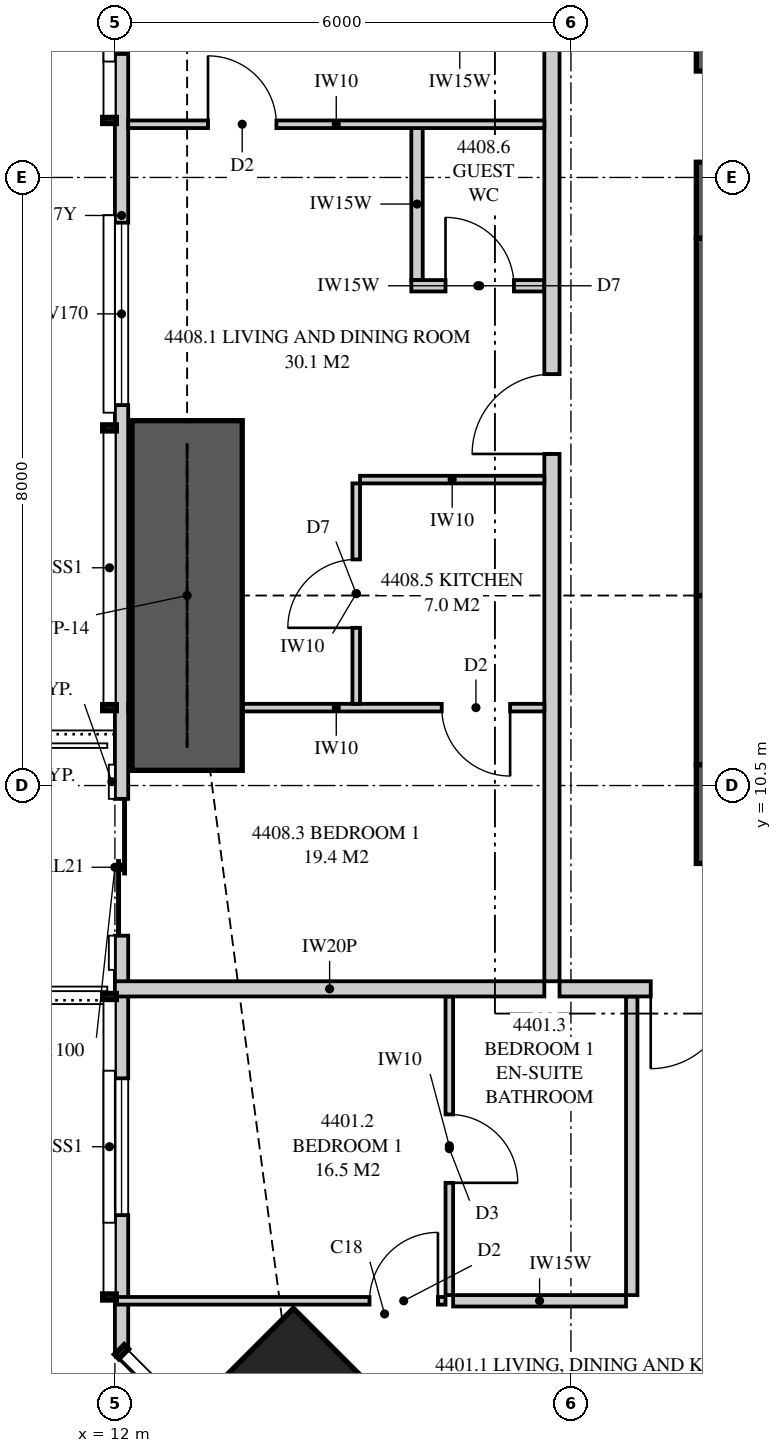
"""IFC4 building model, lengths in metres.
Left out: names, types, materials, properties, quantities, classifications, styles, units other than length and angle.
Written with IfcOpenShell. Run it as: python <this file> out.ifc"""

import sys

from ifc_helpers import new_model, si_unit, direction, frame, frame_2d, origin, origin_2d, place, context, subcontext, project, spatial, polyline, rectangle, outline, extrude, element, fill, save


model = new_model("IFC4")
c1 = context("Model", 3, precision=1e-05, world=origin(), true_north=direction((0.0, 1.0)))
c2 = subcontext(c1, "Body", "Model", "MODEL_VIEW")
j1 = project(units=[si_unit("LENGTHUNIT", "METRE"), si_unit("PLANEANGLEUNIT", "RADIAN")], contexts=[c1])
p1 = place(None, origin())
s1 = spatial("IfcSite", under=j1, at=p1, CompositionType="ELEMENT")
p2 = place(p1, origin())
s2 = spatial("IfcBuilding", under=s1, at=p2, CompositionType="ELEMENT")
p3 = place(p2, frame((0.0, 0.0, 164.4)))
s3 = spatial("IfcBuildingStorey", under=s2, at=p3, CompositionType="ELEMENT", Elevation=164.4)
p4 = place(p3, frame((14.348, 2.348, 0.0), z_axis=(0.0, 0.0, 1.0), x_axis=(0.707106781187, 0.707106781187, 0.0)))
e1 = element("IfcColumn", 1, at=p4, inside=s3, PredefinedType="COLUMN", context=c2, shape_type="SweptSolid", body=[
    extrude(rectangle(XDim=1.8, YDim=1.8, at=origin_2d()), origin(), (0.0, 0.0, 1.0), 3.35),
])
p5 = place(p3, frame((19.65, 10.125, 0.0), z_axis=(0.0, 0.0, 1.0), x_axis=(1.0, 0.0, 0.0)))
e2 = element("IfcWall", 2, at=p5, inside=s3, PredefinedType="SHEAR", context=c2, shape_type="SweptSolid", body=[
    extrude(rectangle(XDim=6.35, YDim=1.3, at=frame_2d((3.175, 0.0))), origin(), (0.0, 0.0, 1.0), 3.35),
])
p6 = place(p5, frame((4.775, 0.0, 0.0)))
e3 = element("IfcOpeningElement", 3, at=p6, cuts=e2, PredefinedType="OPENING", context=c2, shape_type="SweptSolid", body=[
    extrude(rectangle(XDim=0.75, YDim=2.1, at=frame_2d((0.375, 1.05))), frame((0.0, 0.66, 0.0), z_axis=(0.0, -1.0, 0.0), x_axis=(1.0, 0.0, 0.0)), (0.0, 0.0, 1.0), 1.32),
])
p7 = place(p3, frame((20.0, 23.3, 0.0), z_axis=(0.0, 0.0, 1.0), x_axis=(0.0, -1.0, 0.0)))
e4 = element("IfcWall", 4, at=p7, inside=s3, PredefinedType="SHEAR", context=c2, shape_type="SweptSolid", body=[
    extrude(rectangle(XDim=5.6, YDim=0.7, at=frame_2d((2.8, 0.0))), origin(), (0.0, 0.0, 1.0), 3.35),
])
p8 = place(p7, frame((3.4, 0.0, 0.0)))
e5 = element("IfcOpeningElement", 5, at=p8, cuts=e4, PredefinedType="OPENING", context=c2, shape_type="SweptSolid", body=[
    extrude(rectangle(XDim=1.2, YDim=2.2, at=frame_2d((0.6, 1.1))), frame((0.0, 0.36, 0.0), z_axis=(0.0, -1.0, 0.0), x_axis=(1.0, 0.0, 0.0)), (0.0, 0.0, 1.0), 0.72),
])
p9 = place(p3, frame((20.0, 17.7, 0.0), z_axis=(0.0, 0.0, 1.0), x_axis=(0.0, -1.0, 0.0)))
e6 = element("IfcWall", 6, at=p9, inside=s3, PredefinedType="SHEAR", context=c2, shape_type="SweptSolid", body=[
    extrude(rectangle(XDim=4.7, YDim=0.7, at=frame_2d((2.35, 0.0))), origin(), (0.0, 0.0, 1.0), 3.35),
])
p10 = place(p3, frame((20.0, 13.0, 0.0), z_axis=(0.0, 0.0, 1.0), x_axis=(0.0, -1.0, 0.0)))
e7 = element("IfcWall", 7, at=p10, inside=s3, PredefinedType="SHEAR", context=c2, shape_type="SweptSolid", body=[
    extrude(rectangle(XDim=2.225, YDim=0.7, at=frame_2d((1.113, 0.0))), origin(), (0.0, 0.0, 1.0), 3.35),
])
p11 = place(p3, frame((12.087, 32.949, 0.0), z_axis=(0.0, 0.0, 1.0), x_axis=(0.0, -1.0, 0.0)))
e8 = element("IfcWall", 8, at=p11, inside=s3, PredefinedType="SOLIDWALL", context=c2, shape_type="SweptSolid", body=[
    extrude(outline(polyline([(0.0, 0.0), (29.897, 0.0), (29.897, 3.11), (20.191, 3.11), (20.191, 2.15), (20.051, 2.15), (20.051, 3.11), (19.949, 3.11), (19.949, 2.15), (7.949, 2.15), (7.949, 3.11), (7.823, 3.11), (7.823, 2.15), (7.73, 2.15), (7.73, 3.11), (0.0, 3.11), (0.0, 0.0)])), frame((0.0, 0.087, 0.0), z_axis=(0.0, -1.0, 0.0), x_axis=(1.0, 0.0, 0.0)), (0.0, 0.0, 1.0), 0.175),
])
p12 = place(p11, frame((1.297, 0.0, 0.4)))
e9 = element("IfcOpeningElement", 9, at=p12, cuts=e8, PredefinedType="OPENING", context=c2, shape_type="SweptSolid", body=[
    extrude(rectangle(XDim=1.8, YDim=1.7, at=frame_2d((0.9, 0.85))), frame((0.0, 0.097, 0.0), z_axis=(0.0, -1.0, 0.0), x_axis=(1.0, 0.0, 0.0)), (0.0, 0.0, 1.0), 0.195),
])
p13 = place(p11, frame((4.349, 0.0, 0.4)))
e10 = element("IfcOpeningElement", 10, at=p13, cuts=e8, PredefinedType="OPENING", context=c2, shape_type="SweptSolid", body=[
    extrude(rectangle(XDim=1.2, YDim=1.7, at=frame_2d((0.6, 0.85))), frame((0.0, 0.097, 0.0), z_axis=(0.0, -1.0, 0.0), x_axis=(1.0, 0.0, 0.0)), (0.0, 0.0, 1.0), 0.195),
])
p14 = place(p11, frame((11.024, 0.0, 0.4)))
e11 = element("IfcOpeningElement", 11, at=p14, cuts=e8, PredefinedType="OPENING", context=c2, shape_type="SweptSolid", body=[
    extrude(rectangle(XDim=1.8, YDim=1.7, at=frame_2d((0.9, 0.85))), frame((0.0, 0.097, 0.0), z_axis=(0.0, -1.0, 0.0), x_axis=(1.0, 0.0, 0.0)), (0.0, 0.0, 1.0), 0.195),
])
p15 = place(p11, frame((15.044, 0.0, 0.4)))
e12 = element("IfcOpeningElement", 12, at=p15, cuts=e8, PredefinedType="OPENING", context=c2, shape_type="SweptSolid", body=[
    extrude(rectangle(XDim=2.4, YDim=1.7, at=frame_2d((1.2, 0.85))), frame((0.0, 0.097, 0.0), z_axis=(0.0, -1.0, 0.0), x_axis=(1.0, 0.0, 0.0)), (0.0, 0.0, 1.0), 0.195),
])
p16 = place(p11, frame((22.624, 0.0, 0.0)))
e13 = element("IfcOpeningElement", 13, at=p16, cuts=e8, PredefinedType="OPENING", context=c2, shape_type="SweptSolid", body=[
    extrude(rectangle(XDim=1.8, YDim=2.1, at=frame_2d((0.9, 1.05))), frame((0.0, 0.097, 0.0), z_axis=(0.0, -1.0, 0.0), x_axis=(1.0, 0.0, 0.0)), (0.0, 0.0, 1.0), 0.195),
])
p17 = place(p11, frame((26.301, 0.0, 0.4)))
e14 = element("IfcOpeningElement", 14, at=p17, cuts=e8, PredefinedType="OPENING", context=c2, shape_type="SweptSolid", body=[
    extrude(rectangle(XDim=1.8, YDim=1.7, at=frame_2d((0.9, 0.85))), frame((0.0, 0.097, 0.0), z_axis=(0.0, -1.0, 0.0), x_axis=(1.0, 0.0, 0.0)), (0.0, 0.0, 1.0), 0.195),
])
p18 = place(p3, frame((17.85, 7.825, 0.0), z_axis=(0.0, 0.0, 1.0), x_axis=(1.0, 0.0, 0.0)))
e15 = element("IfcWall", 15, at=p18, inside=s3, PredefinedType="PARTITIONING", context=c2, shape_type="SweptSolid", body=[
    extrude(rectangle(XDim=3.25, YDim=0.2, at=frame_2d((1.625, 0.0))), origin(), (0.0, 0.0, 1.0), 3.11),
])
p19 = place(p18, frame((1.2, 0.0, 0.0)))
e16 = element("IfcOpeningElement", 16, at=p19, cuts=e15, PredefinedType="OPENING", context=c2, shape_type="SweptSolid", body=[
    extrude(rectangle(XDim=1.05, YDim=2.2, at=frame_2d((0.525, 1.1))), frame((0.0, 0.11, 0.0), z_axis=(0.0, -1.0, 0.0), x_axis=(1.0, 0.0, 0.0)), (0.0, 0.0, 1.0), 0.22),
])
p20 = place(p3, frame((16.4, 3.796, 0.0), z_axis=(0.0, 0.0, 1.0), x_axis=(0.0, 1.0, 0.0)))
e17 = element("IfcWall", 17, at=p20, inside=s3, PredefinedType="PARTITIONING", context=c2, shape_type="SweptSolid", body=[
    extrude(rectangle(XDim=3.929, YDim=0.1, at=frame_2d((1.964, 0.0))), origin(), (0.0, 0.0, 1.0), 3.11),
])
p21 = place(p20, frame((1.477, 0.0, 0.0)))
e18 = element("IfcOpeningElement", 18, at=p21, cuts=e17, PredefinedType="OPENING", context=c2, shape_type="SweptSolid", body=[
    extrude(rectangle(XDim=0.9, YDim=2.1, at=frame_2d((0.45, 1.05))), frame((0.0, 0.06, 0.0), z_axis=(0.0, -1.0, 0.0), x_axis=(1.0, 0.0, 0.0)), (0.0, 0.0, 1.0), 0.12),
])
p22 = place(p3, frame((16.35, 3.721, 0.0), z_axis=(0.0, 0.0, 1.0), x_axis=(-1.0, 0.0, 0.0)))
e19 = element("IfcWall", 19, at=p22, inside=s3, PredefinedType="PARTITIONING", context=c2, shape_type="SweptSolid", body=[
    extrude(outline(polyline([(0.0, 0.0), (4.35, 0.0), (4.35, 3.11), (3.049, 3.11), (3.049, 2.15), (1.314, 2.15), (1.314, 3.11), (0.0, 3.11), (0.0, 0.0)])), frame((0.0, 0.05, 0.0), z_axis=(0.0, -1.0, 0.0), x_axis=(1.0, 0.0, 0.0)), (0.0, 0.0, 1.0), 0.1),
])
p23 = place(p22, frame((0.1, 0.0, 0.0)))
e20 = element("IfcOpeningElement", 20, at=p23, cuts=e19, PredefinedType="OPENING", context=c2, shape_type="SweptSolid", body=[
    extrude(rectangle(XDim=0.9, YDim=2.1, at=frame_2d((0.45, 1.05))), frame((0.0, 0.06, 0.0), z_axis=(0.0, -1.0, 0.0), x_axis=(1.0, 0.0, 0.0)), (0.0, 0.0, 1.0), 0.12),
])
p24 = place(p3, frame((18.725, 3.721, 0.0), z_axis=(0.0, 0.0, 1.0), x_axis=(-1.0, 0.0, 0.0)))
e21 = element("IfcWall", 21, at=p24, inside=s3, PredefinedType="PLUMBINGWALL", context=c2, shape_type="SweptSolid", body=[
    extrude(rectangle(XDim=2.275, YDim=0.15, at=frame_2d((1.138, 0.0))), origin(), (0.0, 0.0, 1.0), 3.11),
])
p25 = place(p3, frame((18.8, 3.796, 0.0), z_axis=(0.0, 0.0, 1.0), x_axis=(0.0, 1.0, 0.0)))
e22 = element("IfcWall", 22, at=p25, inside=s3, PredefinedType="PLUMBINGWALL", context=c2, shape_type="SweptSolid", body=[
    extrude(rectangle(XDim=3.929, YDim=0.15, at=frame_2d((1.964, 0.0))), origin(), (0.0, 0.0, 1.0), 3.11),
])
p26 = place(p3, frame((12.0, 7.825, 0.0), z_axis=(0.0, 0.0, 1.0), x_axis=(1.0, 0.0, 0.0)))
e23 = element("IfcWall", 23, at=p26, inside=s3, PredefinedType="PARTITIONING", context=c2, shape_type="SweptSolid", body=[
    extrude(outline(polyline([(0.0, 0.0), (5.65, 0.0), (5.65, 3.11), (2.547, 3.11), (2.547, 2.15), (0.712, 2.15), (0.712, 3.11), (0.0, 3.11), (0.0, 0.0)])), frame((0.0, 0.1, 0.0), z_axis=(0.0, -1.0, 0.0), x_axis=(1.0, 0.0, 0.0)), (0.0, 0.0, 1.0), 0.2),
])
p27 = place(p3, frame((17.75, 7.925, 0.0), z_axis=(0.0, 0.0, 1.0), x_axis=(0.0, 1.0, 0.0)))
e24 = element("IfcWall", 24, at=p27, inside=s3, PredefinedType="PARTITIONING", context=c2, shape_type="SweptSolid", body=[
    extrude(outline(polyline([(0.0, 0.0), (14.875, 0.0), (14.875, 3.11), (5.412, 3.11), (5.412, 2.541), (4.738, 2.541), (4.738, 3.11), (0.0, 3.11), (0.0, 0.0)])), frame((0.0, 0.1, 0.0), z_axis=(0.0, -1.0, 0.0), x_axis=(1.0, 0.0, 0.0)), (0.0, 0.0, 1.0), 0.2),
])
p28 = place(p27, frame((6.938, 0.0, 0.0)))
e25 = element("IfcOpeningElement", 25, at=p28, cuts=e24, PredefinedType="OPENING", context=c2, shape_type="SweptSolid", body=[
    extrude(rectangle(XDim=1.05, YDim=2.2, at=frame_2d((0.525, 1.1))), frame((0.0, 0.11, 0.0), z_axis=(0.0, -1.0, 0.0), x_axis=(1.0, 0.0, 0.0)), (0.0, 0.0, 1.0), 0.22),
])
p29 = place(p3, frame((12.175, 11.525, 0.0), z_axis=(0.0, 0.0, 1.0), x_axis=(1.0, 0.0, 0.0)))
e26 = element("IfcWall", 26, at=p29, inside=s3, PredefinedType="PARTITIONING", context=c2, shape_type="SweptSolid", body=[
    extrude(outline(polyline([(0.101, 3.11), (0.0, 3.11), (0.0, 0.0), (0.529, 0.0), (0.529, 0.269), (1.021, 0.269), (1.021, 0.0), (5.475, 0.0), (5.475, 3.11), (1.836, 3.11), (1.836, 2.15), (1.021, 2.15), (1.021, 1.881), (0.529, 1.881), (0.529, 2.15), (0.101, 2.15), (0.101, 3.11)])), frame((0.0, 0.05, 0.0), z_axis=(0.0, -1.0, 0.0), x_axis=(1.0, 0.0, 0.0)), (0.0, 0.0, 1.0), 0.1),
])
p30 = place(p29, frame((4.125, 0.0, 0.0)))
e27 = element("IfcOpeningElement", 27, at=p30, cuts=e26, PredefinedType="OPENING", context=c2, shape_type="SweptSolid", body=[
    extrude(rectangle(XDim=0.9, YDim=2.1, at=frame_2d((0.45, 1.05))), frame((0.0, 0.06, 0.0), z_axis=(0.0, -1.0, 0.0), x_axis=(1.0, 0.0, 0.0)), (0.0, 0.0, 1.0), 0.12),
])
p31 = place(p3, frame((12.175, 19.2, 0.0), z_axis=(0.0, 0.0, 1.0), x_axis=(1.0, 0.0, 0.0)))
e28 = element("IfcWall", 28, at=p31, inside=s3, PredefinedType="PARTITIONING", context=c2, shape_type="SweptSolid", body=[
    extrude(outline(polyline([(0.0, 0.0), (5.475, 0.0), (5.475, 3.11), (1.635, 3.11), (1.635, 2.15), (0.0, 2.15), (0.0, 3.11), (0.0, 0.0)])), frame((0.0, 0.05, 0.0), z_axis=(0.0, -1.0, 0.0), x_axis=(1.0, 0.0, 0.0)), (0.0, 0.0, 1.0), 0.1),
])
p32 = place(p31, frame((1.05, 0.0, 0.0)))
e29 = element("IfcOpeningElement", 29, at=p32, cuts=e28, PredefinedType="OPENING", context=c2, shape_type="SweptSolid", body=[
    extrude(rectangle(XDim=0.9, YDim=2.1, at=frame_2d((0.45, 1.05))), frame((0.0, 0.06, 0.0), z_axis=(0.0, -1.0, 0.0), x_axis=(1.0, 0.0, 0.0)), (0.0, 0.0, 1.0), 0.12),
])
p33 = place(p3, frame((15.175, 11.575, 0.0), z_axis=(0.0, 0.0, 1.0), x_axis=(0.0, 1.0, 0.0)))
e30 = element("IfcWall", 30, at=p33, inside=s3, PredefinedType="PARTITIONING", context=c2, shape_type="SweptSolid", body=[
    extrude(outline(polyline([(0.0, 0.0), (2.9, 0.0), (2.9, 3.11), (1.712, 3.11), (1.712, 2.541), (1.138, 2.541), (1.138, 3.11), (0.0, 3.11), (0.0, 0.0)])), frame((0.0, 0.05, 0.0), z_axis=(0.0, -1.0, 0.0), x_axis=(1.0, 0.0, 0.0)), (0.0, 0.0, 1.0), 0.1),
])
p34 = place(p33, frame((1.0, 0.0, 0.0)))
e31 = element("IfcOpeningElement", 31, at=p34, cuts=e30, PredefinedType="OPENING", context=c2, shape_type="SweptSolid", body=[
    extrude(rectangle(XDim=0.9, YDim=2.1, at=frame_2d((0.45, 1.05))), frame((0.0, 0.06, 0.0), z_axis=(0.0, -1.0, 0.0), x_axis=(1.0, 0.0, 0.0)), (0.0, 0.0, 1.0), 0.12),
])
p35 = place(p3, frame((15.225, 14.525, 0.0), z_axis=(0.0, 0.0, 1.0), x_axis=(1.0, 0.0, 0.0)))
e32 = element("IfcWall", 32, at=p35, inside=s3, PredefinedType="PARTITIONING", context=c2, shape_type="SweptSolid", body=[
    extrude(rectangle(XDim=2.425, YDim=0.1, at=frame_2d((1.212, 0.0))), origin(), (0.0, 0.0, 1.0), 3.11),
])
p36 = place(p3, frame((17.65, 17.075, 0.0), z_axis=(0.0, 0.0, 1.0), x_axis=(-1.0, 0.0, 0.0)))
e33 = element("IfcWall", 33, at=p36, inside=s3, PredefinedType="PLUMBINGWALL", context=c2, shape_type="SweptSolid", body=[
    extrude(rectangle(XDim=1.75, YDim=0.15, at=frame_2d((0.875, 0.0))), origin(), (0.0, 0.0, 1.0), 3.11),
])
p37 = place(p36, frame((0.4, 0.0, 0.0)))
e34 = element("IfcOpeningElement", 34, at=p37, cuts=e33, PredefinedType="OPENING", context=c2, shape_type="SweptSolid", body=[
    extrude(rectangle(XDim=0.9, YDim=2.1, at=frame_2d((0.45, 1.05))), frame((0.0, 0.085, 0.0), z_axis=(0.0, -1.0, 0.0), x_axis=(1.0, 0.0, 0.0)), (0.0, 0.0, 1.0), 0.17),
])
p38 = place(p3, frame((15.975, 19.15, 0.0), z_axis=(0.0, 0.0, 1.0), x_axis=(0.0, -1.0, 0.0)))
e35 = element("IfcWall", 35, at=p38, inside=s3, PredefinedType="PLUMBINGWALL", context=c2, shape_type="SweptSolid", body=[
    extrude(rectangle(XDim=2.0, YDim=0.15, at=frame_2d((1.0, 0.0))), origin(), (0.0, 0.0, 1.0), 3.11),
])
p39 = place(p3, frame((12.95, 10.7, 0.0), z_axis=(0.0, 0.0, 1.0), x_axis=(0.0, 1.0, 0.0)))
e36 = element("IfcWall", 36, at=p39, inside=s3, PredefinedType="SHEAR", context=c2, shape_type="SweptSolid", body=[
    extrude(rectangle(XDim=4.6, YDim=1.45, at=frame_2d((2.3, 0.0))), origin(), (0.0, 0.0, 1.0), 3.35),
])
p40 = place(p14, origin())
e37 = element("IfcWindow", 37, at=p40, inside=s3, PartitioningType="SINGLE_PANEL", PredefinedType="WINDOW", context=c2, shape_type="SweptSolid", body=[
    extrude(rectangle(XDim=1.8, YDim=1.7, at=frame_2d((0.9, 0.85))), frame((0.0, 0.03, 0.0), z_axis=(0.0, -1.0, 0.0), x_axis=(1.0, 0.0, 0.0)), (0.0, 0.0, 1.0), 0.06),
])
fill(e11, e37)
p41 = place(p15, origin())
e38 = element("IfcWindow", 38, at=p41, inside=s3, PartitioningType="SINGLE_PANEL", PredefinedType="WINDOW", context=c2, shape_type="SweptSolid", body=[
    extrude(rectangle(XDim=2.4, YDim=1.7, at=frame_2d((1.2, 0.85))), frame((0.0, 0.03, 0.0), z_axis=(0.0, -1.0, 0.0), x_axis=(1.0, 0.0, 0.0)), (0.0, 0.0, 1.0), 0.06),
])
fill(e12, e38)
p42 = place(p16, origin())
e39 = element("IfcDoor", 39, at=p42, inside=s3, OperationType="SLIDING_TO_LEFT", PredefinedType="DOOR", context=c2, shape_type="SweptSolid", body=[
    extrude(rectangle(XDim=1.8, YDim=2.1, at=frame_2d((0.9, 1.05))), frame((0.0, 0.025, 0.0), z_axis=(0.0, -1.0, 0.0), x_axis=(1.0, 0.0, 0.0)), (0.0, 0.0, 1.0), 0.05),
])
fill(e13, e39)
p43 = place(p17, origin())
e40 = element("IfcWindow", 40, at=p43, inside=s3, PartitioningType="SINGLE_PANEL", PredefinedType="WINDOW", context=c2, shape_type="SweptSolid", body=[
    extrude(rectangle(XDim=1.8, YDim=1.7, at=frame_2d((0.9, 0.85))), frame((0.0, 0.03, 0.0), z_axis=(0.0, -1.0, 0.0), x_axis=(1.0, 0.0, 0.0)), (0.0, 0.0, 1.0), 0.06),
])
fill(e14, e40)
p44 = place(p19, frame((1.05, 0.0, 0.0), z_axis=(0.0, 0.0, 1.0), x_axis=(-1.0, 0.0, 0.0)))
e41 = element("IfcDoor", 41, at=p44, inside=s3, OperationType="SINGLE_SWING_RIGHT", PredefinedType="DOOR", context=c2, shape_type="SweptSolid", body=[
    extrude(rectangle(XDim=1.05, YDim=2.2, at=frame_2d((0.525, 1.1))), frame((0.0, 0.025, 0.0), z_axis=(0.0, -1.0, 0.0), x_axis=(1.0, 0.0, 0.0)), (0.0, 0.0, 1.0), 0.05),
])
fill(e16, e41)
p45 = place(p23, frame((0.9, 0.0, 0.0), z_axis=(0.0, 0.0, 1.0), x_axis=(-1.0, 0.0, 0.0)))
e42 = element("IfcDoor", 42, at=p45, inside=s3, OperationType="SINGLE_SWING_RIGHT", PredefinedType="DOOR", context=c2, shape_type="SweptSolid", body=[
    extrude(rectangle(XDim=0.9, YDim=2.1, at=frame_2d((0.45, 1.05))), frame((0.0, 0.025, 0.0), z_axis=(0.0, -1.0, 0.0), x_axis=(1.0, 0.0, 0.0)), (0.0, 0.0, 1.0), 0.05),
])
fill(e20, e42)
p46 = place(p21, frame((0.9, 0.0, 0.0), z_axis=(0.0, 0.0, 1.0), x_axis=(-1.0, 0.0, 0.0)))
e43 = element("IfcDoor", 43, at=p46, inside=s3, OperationType="SINGLE_SWING_RIGHT", PredefinedType="DOOR", context=c2, shape_type="SweptSolid", body=[
    extrude(rectangle(XDim=0.9, YDim=2.1, at=frame_2d((0.45, 1.05))), frame((0.0, 0.025, 0.0), z_axis=(0.0, -1.0, 0.0), x_axis=(1.0, 0.0, 0.0)), (0.0, 0.0, 1.0), 0.05),
])
fill(e18, e43)
p47 = place(p28, origin())
e44 = element("IfcDoor", 44, at=p47, inside=s3, OperationType="SINGLE_SWING_LEFT", PredefinedType="DOOR", context=c2, shape_type="SweptSolid", body=[
    extrude(rectangle(XDim=1.05, YDim=2.2, at=frame_2d((0.525, 1.1))), frame((0.0, 0.025, 0.0), z_axis=(0.0, -1.0, 0.0), x_axis=(1.0, 0.0, 0.0)), (0.0, 0.0, 1.0), 0.05),
])
fill(e25, e44)
p48 = place(p30, frame((0.9, 0.0, 0.0), z_axis=(0.0, 0.0, 1.0), x_axis=(-1.0, 0.0, 0.0)))
e45 = element("IfcDoor", 45, at=p48, inside=s3, OperationType="SINGLE_SWING_LEFT", PredefinedType="DOOR", context=c2, shape_type="SweptSolid", body=[
    extrude(rectangle(XDim=0.9, YDim=2.1, at=frame_2d((0.45, 1.05))), frame((0.0, 0.025, 0.0), z_axis=(0.0, -1.0, 0.0), x_axis=(1.0, 0.0, 0.0)), (0.0, 0.0, 1.0), 0.05),
])
fill(e27, e45)
p49 = place(p32, origin())
e46 = element("IfcDoor", 46, at=p49, inside=s3, OperationType="SINGLE_SWING_LEFT", PredefinedType="DOOR", context=c2, shape_type="SweptSolid", body=[
    extrude(rectangle(XDim=0.9, YDim=2.1, at=frame_2d((0.45, 1.05))), frame((0.0, 0.025, 0.0), z_axis=(0.0, -1.0, 0.0), x_axis=(1.0, 0.0, 0.0)), (0.0, 0.0, 1.0), 0.05),
])
fill(e29, e46)
p50 = place(p34, origin())
e47 = element("IfcDoor", 47, at=p50, inside=s3, OperationType="SINGLE_SWING_LEFT", PredefinedType="DOOR", context=c2, shape_type="SweptSolid", body=[
    extrude(rectangle(XDim=0.9, YDim=2.1, at=frame_2d((0.45, 1.05))), frame((0.0, 0.025, 0.0), z_axis=(0.0, -1.0, 0.0), x_axis=(1.0, 0.0, 0.0)), (0.0, 0.0, 1.0), 0.05),
])
fill(e31, e47)
p51 = place(p37, frame((0.9, 0.0, 0.0), z_axis=(0.0, 0.0, 1.0), x_axis=(-1.0, 0.0, 0.0)))
e48 = element("IfcDoor", 48, at=p51, inside=s3, OperationType="SINGLE_SWING_LEFT", PredefinedType="DOOR", context=c2, shape_type="SweptSolid", body=[
    extrude(rectangle(XDim=0.9, YDim=2.1, at=frame_2d((0.45, 1.05))), frame((0.0, 0.025, 0.0), z_axis=(0.0, -1.0, 0.0), x_axis=(1.0, 0.0, 0.0)), (0.0, 0.0, 1.0), 0.05),
])
fill(e34, e48)
save(model, sys.argv[1])
